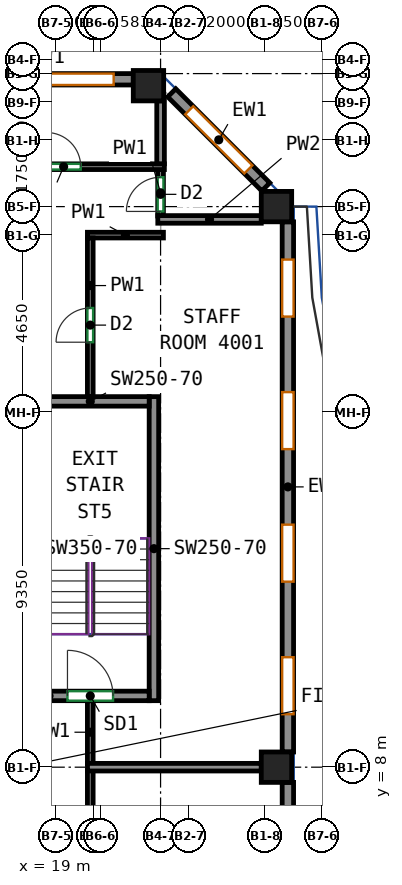
"""IFC4 building model, lengths in metres.
Left out: names, types, materials, properties, quantities, classifications, styles, units other than length and angle.
Written with IfcOpenShell. Run it as: python <this file> out.ifc"""

import sys

from ifc_helpers import new_model, si_unit, direction, frame, frame_2d, origin, origin_2d, place, context, subcontext, project, spatial, rectangle, extrude, source, transform, mapped, element, fill, save


model = new_model("IFC4")
c1 = context("Model", 3, precision=1e-05, world=origin(), true_north=direction((0.0, 1.0)))
c2 = subcontext(c1, "Body", "Model", "MODEL_VIEW")
j1 = project(units=[si_unit("LENGTHUNIT", "METRE"), si_unit("PLANEANGLEUNIT", "RADIAN")], contexts=[c1])
p1 = place(None, origin())
s1 = spatial("IfcSite", under=j1, at=p1, CompositionType="ELEMENT")
p2 = place(p1, origin())
s2 = spatial("IfcBuilding", under=s1, at=p2, CompositionType="ELEMENT")
p3 = place(p2, frame((0.0, 0.0, 171.9)))
s3 = spatial("IfcBuildingStorey", under=s2, at=p3, CompositionType="ELEMENT", Elevation=171.9)
m1 = source(origin(), c2, "Body", "SweptSolid", [
    extrude(rectangle(XDim=0.8, YDim=0.8, at=origin_2d()), origin(), (0.0, 0.0, 1.0), 3.12),
])
for number, where, z_axis, x_axis in (
    (1, (21.432, 25.932, 0.0), (0.0, 0.0, 1.0), (1.0, 0.0, 0.0)),
    (2, (24.8, 8.0, 0.0), (0.0, 0.0, 1.0), (1.0, 0.0, 0.0)),
    (3, (24.8, 22.75, 0.0), (0.0, 0.0, 1.0), (1.0, 0.0, 0.0)),
):
    element("IfcColumn", number, at=place(p3, frame(where, z_axis=z_axis, x_axis=x_axis)), inside=s3, PredefinedType="COLUMN", context=c2, shape_type="MappedRepresentation", body=[
        mapped(m1, transform((0.0, 0.0, 0.0))),
    ])
m2 = source(origin(), c2, "Body", "SweptSolid", [
    extrude(rectangle(XDim=8.0, YDim=0.25, at=frame_2d((4.0, 0.0))), origin(), (0.0, 0.0, 1.0), 3.12),
])
p4 = place(p3, frame((21.575, 9.75, 0.0), z_axis=(0.0, 0.0, 1.0), x_axis=(0.0, 1.0, 0.0)))
e4 = element("IfcWall", 4, at=p4, inside=s3, PredefinedType="SHEAR", context=c2, shape_type="MappedRepresentation", body=[
    mapped(m2, transform((0.0, 0.0, 0.0))),
])
m3 = source(origin(), c2, "Body", "SweptSolid", [
    extrude(rectangle(XDim=3.1, YDim=0.25, at=frame_2d((1.55, 0.0))), origin(), (0.0, 0.0, 1.0), 3.12),
])
p5 = place(p3, frame((18.35, 9.875, 0.0), z_axis=(0.0, 0.0, 1.0), x_axis=(1.0, 0.0, 0.0)))
e5 = element("IfcWall", 5, at=p5, inside=s3, PredefinedType="SHEAR", context=c2, shape_type="MappedRepresentation", body=[
    mapped(m3, transform((0.0, 0.0, 0.0))),
])
p6 = place(p5, frame((0.95, 0.0, 0.0)))
e6 = element("IfcOpeningElement", 6, at=p6, cuts=e5, PredefinedType="OPENING", context=c2, shape_type="SweptSolid", body=[
    extrude(rectangle(XDim=1.2, YDim=2.1, at=frame_2d((0.6, 1.05))), frame((0.0, 0.135, 0.0), z_axis=(0.0, -1.0, 0.0), x_axis=(1.0, 0.0, 0.0)), (0.0, 0.0, 1.0), 0.27),
])
p7 = place(p3, frame((18.35, 17.625, 0.0), z_axis=(0.0, 0.0, 1.0), x_axis=(1.0, 0.0, 0.0)))
e7 = element("IfcWall", 7, at=p7, inside=s3, PredefinedType="SHEAR", context=c2, shape_type="MappedRepresentation", body=[
    mapped(m3, transform((0.0, 0.0, 0.0))),
])
m4 = source(origin(), c2, "Body", "SweptSolid", [
    extrude(rectangle(XDim=7.763, YDim=0.3, at=frame_2d((3.881, 0.0))), origin(), (0.0, 0.0, 1.0), 3.12),
])
p8 = place(p3, frame((25.1, -0.163, 0.0), z_axis=(0.0, 0.0, 1.0), x_axis=(0.0, 1.0, 0.0)))
e8 = element("IfcWall", 8, at=p8, inside=s3, PredefinedType="SOLIDWALL", context=c2, shape_type="MappedRepresentation", body=[
    mapped(m4, transform((0.0, 0.0, 0.0))),
])
p9 = place(p8, frame((1.75, 0.0, 0.85)))
e9 = element("IfcOpeningElement", 9, at=p9, cuts=e8, PredefinedType="OPENING", context=c2, shape_type="SweptSolid", body=[
    extrude(rectangle(XDim=1.5, YDim=1.95, at=frame_2d((0.75, 0.975))), frame((0.0, 0.16, 0.0), z_axis=(0.0, -1.0, 0.0), x_axis=(1.0, 0.0, 0.0)), (0.0, 0.0, 1.0), 0.32),
])
p10 = place(p8, frame((5.631, 0.0, 0.85)))
e10 = element("IfcOpeningElement", 10, at=p10, cuts=e8, PredefinedType="OPENING", context=c2, shape_type="SweptSolid", body=[
    extrude(rectangle(XDim=1.5, YDim=1.95, at=frame_2d((0.75, 0.975))), frame((0.0, 0.16, 0.0), z_axis=(0.0, -1.0, 0.0), x_axis=(1.0, 0.0, 0.0)), (0.0, 0.0, 1.0), 0.32),
])
p11 = place(p8, frame((4.331, 0.0, 0.0)))
e11 = element("IfcOpeningElement", 11, at=p11, cuts=e8, PredefinedType="OPENING", context=c2, shape_type="SweptSolid", body=[
    extrude(rectangle(XDim=1.0, YDim=2.1, at=frame_2d((0.5, 1.05))), frame((0.0, 0.16, 0.0), z_axis=(0.0, -1.0, 0.0), x_axis=(1.0, 0.0, 0.0)), (0.0, 0.0, 1.0), 0.32),
])
m5 = source(origin(), c2, "Body", "SweptSolid", [
    extrude(rectangle(XDim=13.95, YDim=0.3, at=frame_2d((6.975, 0.0))), origin(), (0.0, 0.0, 1.0), 3.12),
])
p12 = place(p3, frame((25.1, 8.4, 0.0), z_axis=(0.0, 0.0, 1.0), x_axis=(0.0, 1.0, 0.0)))
e12 = element("IfcWall", 12, at=p12, inside=s3, PredefinedType="SOLIDWALL", context=c2, shape_type="MappedRepresentation", body=[
    mapped(m5, transform((0.0, 0.0, 0.0))),
])
p13 = place(p12, frame((0.994, 0.0, 0.85)))
e13 = element("IfcOpeningElement", 13, at=p13, cuts=e12, PredefinedType="OPENING", context=c2, shape_type="SweptSolid", body=[
    extrude(rectangle(XDim=1.5, YDim=1.95, at=frame_2d((0.75, 0.975))), frame((0.0, 0.16, 0.0), z_axis=(0.0, -1.0, 0.0), x_axis=(1.0, 0.0, 0.0)), (0.0, 0.0, 1.0), 0.32),
])
p14 = place(p12, frame((4.481, 0.0, 0.85)))
e14 = element("IfcOpeningElement", 14, at=p14, cuts=e12, PredefinedType="OPENING", context=c2, shape_type="SweptSolid", body=[
    extrude(rectangle(XDim=1.5, YDim=1.95, at=frame_2d((0.75, 0.975))), frame((0.0, 0.16, 0.0), z_axis=(0.0, -1.0, 0.0), x_axis=(1.0, 0.0, 0.0)), (0.0, 0.0, 1.0), 0.32),
])
p15 = place(p12, frame((7.969, 0.0, 0.85)))
e15 = element("IfcOpeningElement", 15, at=p15, cuts=e12, PredefinedType="OPENING", context=c2, shape_type="SweptSolid", body=[
    extrude(rectangle(XDim=1.5, YDim=1.95, at=frame_2d((0.75, 0.975))), frame((0.0, 0.16, 0.0), z_axis=(0.0, -1.0, 0.0), x_axis=(1.0, 0.0, 0.0)), (0.0, 0.0, 1.0), 0.32),
])
p16 = place(p12, frame((11.456, 0.0, 0.85)))
e16 = element("IfcOpeningElement", 16, at=p16, cuts=e12, PredefinedType="OPENING", context=c2, shape_type="SweptSolid", body=[
    extrude(rectangle(XDim=1.5, YDim=1.95, at=frame_2d((0.75, 0.975))), frame((0.0, 0.16, 0.0), z_axis=(0.0, -1.0, 0.0), x_axis=(1.0, 0.0, 0.0)), (0.0, 0.0, 1.0), 0.32),
])
m6 = source(origin(), c2, "Body", "SweptSolid", [
    extrude(rectangle(XDim=3.5, YDim=0.3, at=frame_2d((1.75, 0.0))), origin(), (0.0, 0.0, 1.0), 3.12),
])
p17 = place(p3, frame((24.519, 23.269, 0.0), z_axis=(0.0, 0.0, 1.0), x_axis=(-0.70707190453, 0.707141656123, 0.0)))
e17 = element("IfcWall", 17, at=p17, inside=s3, PredefinedType="SOLIDWALL", context=c2, shape_type="MappedRepresentation", body=[
    mapped(m6, transform((0.0, 0.0, 0.0))),
])
p18 = place(p17, frame((0.65, 0.0, 0.85)))
e18 = element("IfcOpeningElement", 18, at=p18, cuts=e17, PredefinedType="OPENING", context=c2, shape_type="SweptSolid", body=[
    extrude(rectangle(XDim=2.2, YDim=1.95, at=frame_2d((1.1, 0.975))), frame((0.0, 0.16, 0.0), z_axis=(0.0, -1.0, 0.0), x_axis=(1.0, 0.0, 0.0)), (0.0, 0.0, 1.0), 0.32),
])
m7 = source(origin(), c2, "Body", "SweptSolid", [
    extrude(rectangle(XDim=6.465, YDim=0.3, at=frame_2d((3.232, 0.0))), origin(), (0.0, 0.0, 1.0), 3.12),
])
p19 = place(p3, frame((21.032, 26.1, 0.0), z_axis=(0.0, 0.0, 1.0), x_axis=(-1.0, 0.0, 0.0)))
e19 = element("IfcWall", 19, at=p19, inside=s3, PredefinedType="SOLIDWALL", context=c2, shape_type="MappedRepresentation", body=[
    mapped(m7, transform((0.0, 0.0, 0.0))),
])
p20 = place(p19, frame((0.516, 0.0, 0.85)))
e20 = element("IfcOpeningElement", 20, at=p20, cuts=e19, PredefinedType="OPENING", context=c2, shape_type="SweptSolid", body=[
    extrude(rectangle(XDim=2.2, YDim=1.95, at=frame_2d((1.1, 0.975))), frame((0.0, 0.16, 0.0), z_axis=(0.0, -1.0, 0.0), x_axis=(1.0, 0.0, 0.0)), (0.0, 0.0, 1.0), 0.32),
])
p21 = place(p19, frame((3.749, 0.0, 0.85)))
e21 = element("IfcOpeningElement", 21, at=p21, cuts=e19, PredefinedType="OPENING", context=c2, shape_type="SweptSolid", body=[
    extrude(rectangle(XDim=2.2, YDim=1.95, at=frame_2d((1.1, 0.975))), frame((0.0, 0.16, 0.0), z_axis=(0.0, -1.0, 0.0), x_axis=(1.0, 0.0, 0.0)), (0.0, 0.0, 1.0), 0.32),
])
p22 = place(p3, frame((19.9, 3.809, 0.0), z_axis=(0.0, 0.0, 1.0), x_axis=(0.0, 1.0, 0.0)))
e22 = element("IfcWall", 22, at=p22, inside=s3, PredefinedType="PARTITIONING", context=c2, shape_type="SweptSolid", body=[
    extrude(rectangle(XDim=4.101, YDim=0.15, at=frame_2d((2.05, 0.0))), origin(), (0.0, 0.0, 1.0), 3.12),
])
p23 = place(p22, frame((0.4, 0.0, 0.0)))
e23 = element("IfcOpeningElement", 23, at=p23, cuts=e22, PredefinedType="OPENING", context=c2, shape_type="SweptSolid", body=[
    extrude(rectangle(XDim=1.0, YDim=2.1, at=frame_2d((0.5, 1.05))), frame((0.0, 0.085, 0.0), z_axis=(0.0, -1.0, 0.0), x_axis=(1.0, 0.0, 0.0)), (0.0, 0.0, 1.0), 0.17),
])
p24 = place(p3, frame((19.825, 22.0, 0.0), z_axis=(0.0, 0.0, 1.0), x_axis=(1.0, 0.0, 0.0)))
e24 = element("IfcWall", 24, at=p24, inside=s3, PredefinedType="PARTITIONING", context=c2, shape_type="SweptSolid", body=[
    extrude(rectangle(XDim=2.0, YDim=0.15, at=frame_2d((1.0, 0.0))), origin(), (0.0, 0.0, 1.0), 3.12),
])
p25 = place(p3, frame((19.9, 17.75, 0.0), z_axis=(0.0, 0.0, 1.0), x_axis=(0.0, 1.0, 0.0)))
e25 = element("IfcWall", 25, at=p25, inside=s3, PredefinedType="PARTITIONING", context=c2, shape_type="SweptSolid", body=[
    extrude(rectangle(XDim=4.175, YDim=0.15, at=frame_2d((2.087, 0.0))), origin(), (0.0, 0.0, 1.0), 3.12),
])
p26 = place(p25, frame((1.432, 0.0, 0.0)))
e26 = element("IfcOpeningElement", 26, at=p26, cuts=e25, PredefinedType="OPENING", context=c2, shape_type="SweptSolid", body=[
    extrude(rectangle(XDim=0.9, YDim=2.1, at=frame_2d((0.45, 1.05))), frame((0.0, 0.085, 0.0), z_axis=(0.0, -1.0, 0.0), x_axis=(1.0, 0.0, 0.0)), (0.0, 0.0, 1.0), 0.17),
])
p27 = place(p3, frame((19.9, 8.09, 0.0), z_axis=(0.0, 0.0, 1.0), x_axis=(0.0, 1.0, 0.0)))
e27 = element("IfcWall", 27, at=p27, inside=s3, PredefinedType="PARTITIONING", context=c2, shape_type="SweptSolid", body=[
    extrude(rectangle(XDim=1.66, YDim=0.15, at=frame_2d((0.83, 0.0))), origin(), (0.0, 0.0, 1.0), 3.12),
])
p28 = place(p3, frame((21.75, 22.503, 0.0), z_axis=(0.0, 0.0, 1.0), x_axis=(0.0, 1.0, 0.0)))
e28 = element("IfcWall", 28, at=p28, inside=s3, PredefinedType="PARTITIONING", context=c2, shape_type="SweptSolid", body=[
    extrude(rectangle(XDim=1.222, YDim=0.15, at=frame_2d((0.611, 0.0))), origin(), (0.0, 0.0, 1.0), 3.12),
])
p29 = place(p28, frame((0.12, 0.0, 0.0)))
e29 = element("IfcOpeningElement", 29, at=p29, cuts=e28, PredefinedType="OPENING", context=c2, shape_type="SweptSolid", body=[
    extrude(rectangle(XDim=0.9, YDim=2.1, at=frame_2d((0.45, 1.05))), frame((0.0, 0.085, 0.0), z_axis=(0.0, -1.0, 0.0), x_axis=(1.0, 0.0, 0.0)), (0.0, 0.0, 1.0), 0.17),
])
p30 = place(p3, frame((-20.059, 23.8, 0.0), z_axis=(0.0, 0.0, 1.0), x_axis=(1.0, 0.0, 0.0)))
e30 = element("IfcWall", 30, at=p30, inside=s3, PredefinedType="PARTITIONING", context=c2, shape_type="SweptSolid", body=[
    extrude(rectangle(XDim=41.909, YDim=0.15, at=frame_2d((20.955, 0.0))), origin(), (0.0, 0.0, 1.0), 3.12),
])
p31 = place(p30, frame((2.101, 0.0, 0.0)))
e31 = element("IfcOpeningElement", 31, at=p31, cuts=e30, PredefinedType="OPENING", context=c2, shape_type="SweptSolid", body=[
    extrude(rectangle(XDim=0.9, YDim=2.1, at=frame_2d((0.45, 1.05))), frame((0.0, 0.085, 0.0), z_axis=(0.0, -1.0, 0.0), x_axis=(1.0, 0.0, 0.0)), (0.0, 0.0, 1.0), 0.17),
])
p32 = place(p30, frame((4.585, 0.0, 0.0)))
e32 = element("IfcOpeningElement", 32, at=p32, cuts=e30, PredefinedType="OPENING", context=c2, shape_type="SweptSolid", body=[
    extrude(rectangle(XDim=1.0, YDim=2.1, at=frame_2d((0.5, 1.05))), frame((0.0, 0.085, 0.0), z_axis=(0.0, -1.0, 0.0), x_axis=(1.0, 0.0, 0.0)), (0.0, 0.0, 1.0), 0.17),
])
p33 = place(p30, frame((8.175, 0.0, 0.0)))
e33 = element("IfcOpeningElement", 33, at=p33, cuts=e30, PredefinedType="OPENING", context=c2, shape_type="SweptSolid", body=[
    extrude(rectangle(XDim=0.9, YDim=2.1, at=frame_2d((0.45, 1.05))), frame((0.0, 0.085, 0.0), z_axis=(0.0, -1.0, 0.0), x_axis=(1.0, 0.0, 0.0)), (0.0, 0.0, 1.0), 0.17),
])
p34 = place(p30, frame((13.173, 0.0, 0.0)))
e34 = element("IfcOpeningElement", 34, at=p34, cuts=e30, PredefinedType="OPENING", context=c2, shape_type="SweptSolid", body=[
    extrude(rectangle(XDim=1.0, YDim=2.1, at=frame_2d((0.5, 1.05))), frame((0.0, 0.085, 0.0), z_axis=(0.0, -1.0, 0.0), x_axis=(1.0, 0.0, 0.0)), (0.0, 0.0, 1.0), 0.17),
])
p35 = place(p30, frame((15.658, 0.0, 0.0)))
e35 = element("IfcOpeningElement", 35, at=p35, cuts=e30, PredefinedType="OPENING", context=c2, shape_type="SweptSolid", body=[
    extrude(rectangle(XDim=0.9, YDim=2.1, at=frame_2d((0.45, 1.05))), frame((0.0, 0.085, 0.0), z_axis=(0.0, -1.0, 0.0), x_axis=(1.0, 0.0, 0.0)), (0.0, 0.0, 1.0), 0.17),
])
p36 = place(p30, frame((21.315, 0.0, 0.0)))
e36 = element("IfcOpeningElement", 36, at=p36, cuts=e30, PredefinedType="OPENING", context=c2, shape_type="SweptSolid", body=[
    extrude(rectangle(XDim=0.9, YDim=2.1, at=frame_2d((0.45, 1.05))), frame((0.0, 0.085, 0.0), z_axis=(0.0, -1.0, 0.0), x_axis=(1.0, 0.0, 0.0)), (0.0, 0.0, 1.0), 0.17),
])
p37 = place(p30, frame((24.625, 0.0, 0.0)))
e37 = element("IfcOpeningElement", 37, at=p37, cuts=e30, PredefinedType="OPENING", context=c2, shape_type="SweptSolid", body=[
    extrude(rectangle(XDim=1.0, YDim=2.1, at=frame_2d((0.5, 1.05))), frame((0.0, 0.085, 0.0), z_axis=(0.0, -1.0, 0.0), x_axis=(1.0, 0.0, 0.0)), (0.0, 0.0, 1.0), 0.17),
])
p38 = place(p30, frame((29.043, 0.0, 0.0)))
e38 = element("IfcOpeningElement", 38, at=p38, cuts=e30, PredefinedType="OPENING", context=c2, shape_type="SweptSolid", body=[
    extrude(rectangle(XDim=0.9, YDim=2.1, at=frame_2d((0.45, 1.05))), frame((0.0, 0.085, 0.0), z_axis=(0.0, -1.0, 0.0), x_axis=(1.0, 0.0, 0.0)), (0.0, 0.0, 1.0), 0.17),
])
p39 = place(p30, frame((32.735, 0.0, 0.0)))
e39 = element("IfcOpeningElement", 39, at=p39, cuts=e30, PredefinedType="OPENING", context=c2, shape_type="SweptSolid", body=[
    extrude(rectangle(XDim=1.0, YDim=2.1, at=frame_2d((0.5, 1.05))), frame((0.0, 0.085, 0.0), z_axis=(0.0, -1.0, 0.0), x_axis=(1.0, 0.0, 0.0)), (0.0, 0.0, 1.0), 0.17),
])
p40 = place(p30, frame((36.627, 0.0, 0.0)))
e40 = element("IfcOpeningElement", 40, at=p40, cuts=e30, PredefinedType="OPENING", context=c2, shape_type="SweptSolid", body=[
    extrude(rectangle(XDim=0.9, YDim=2.1, at=frame_2d((0.45, 1.05))), frame((0.0, 0.085, 0.0), z_axis=(0.0, -1.0, 0.0), x_axis=(1.0, 0.0, 0.0)), (0.0, 0.0, 1.0), 0.17),
])
p41 = place(p30, frame((38.808, 0.0, 0.0)))
e41 = element("IfcOpeningElement", 41, at=p41, cuts=e30, PredefinedType="OPENING", context=c2, shape_type="SweptSolid", body=[
    extrude(rectangle(XDim=0.9, YDim=2.1, at=frame_2d((0.45, 1.05))), frame((0.0, 0.085, 0.0), z_axis=(0.0, -1.0, 0.0), x_axis=(1.0, 0.0, 0.0)), (0.0, 0.0, 1.0), 0.17),
])
p42 = place(p3, frame((19.827, 8.0, 0.0), z_axis=(0.0, 0.0, 1.0), x_axis=(1.0, 0.0, 0.0)))
e42 = element("IfcWall", 42, at=p42, inside=s3, PredefinedType="PARTITIONING", context=c2, shape_type="SweptSolid", body=[
    extrude(rectangle(XDim=4.573, YDim=0.2, at=frame_2d((2.287, 0.0))), origin(), (0.0, 0.0, 1.0), 3.12),
])
p43 = place(p3, frame((24.4, 22.413, 0.0), z_axis=(0.0, 0.0, 1.0), x_axis=(-1.0, 0.0, 0.0)))
e43 = element("IfcWall", 43, at=p43, inside=s3, PredefinedType="PARTITIONING", context=c2, shape_type="SweptSolid", body=[
    extrude(rectangle(XDim=2.723, YDim=0.2, at=frame_2d((1.361, 0.0))), origin(), (0.0, 0.0, 1.0), 2.52),
])
p44 = place(p3, frame((21.75, 25.532, 0.0), z_axis=(0.0, 0.0, 1.0), x_axis=(0.0, -1.0, 0.0)))
e44 = element("IfcWall", 44, at=p44, inside=s3, PredefinedType="PARTITIONING", context=c2, shape_type="SweptSolid", body=[
    extrude(rectangle(XDim=1.655, YDim=0.2, at=frame_2d((0.828, 0.0))), origin(), (0.0, 0.0, 1.0), 3.12),
])
p45 = place(p13, origin())
e45 = element("IfcWindow", 45, at=p45, inside=s3, PartitioningType="SINGLE_PANEL", PredefinedType="WINDOW", context=c2, shape_type="SweptSolid", body=[
    extrude(rectangle(XDim=1.5, YDim=1.95, at=frame_2d((0.75, 0.975))), frame((0.0, 0.03, 0.0), z_axis=(0.0, -1.0, 0.0), x_axis=(1.0, 0.0, 0.0)), (0.0, 0.0, 1.0), 0.06),
])
fill(e13, e45)
p46 = place(p14, origin())
e46 = element("IfcWindow", 46, at=p46, inside=s3, PartitioningType="SINGLE_PANEL", PredefinedType="WINDOW", context=c2, shape_type="SweptSolid", body=[
    extrude(rectangle(XDim=1.5, YDim=1.95, at=frame_2d((0.75, 0.975))), frame((0.0, 0.03, 0.0), z_axis=(0.0, -1.0, 0.0), x_axis=(1.0, 0.0, 0.0)), (0.0, 0.0, 1.0), 0.06),
])
fill(e14, e46)
p47 = place(p15, origin())
e47 = element("IfcWindow", 47, at=p47, inside=s3, PartitioningType="SINGLE_PANEL", PredefinedType="WINDOW", context=c2, shape_type="SweptSolid", body=[
    extrude(rectangle(XDim=1.5, YDim=1.95, at=frame_2d((0.75, 0.975))), frame((0.0, 0.03, 0.0), z_axis=(0.0, -1.0, 0.0), x_axis=(1.0, 0.0, 0.0)), (0.0, 0.0, 1.0), 0.06),
])
fill(e15, e47)
p48 = place(p16, origin())
e48 = element("IfcWindow", 48, at=p48, inside=s3, PartitioningType="SINGLE_PANEL", PredefinedType="WINDOW", context=c2, shape_type="SweptSolid", body=[
    extrude(rectangle(XDim=1.5, YDim=1.95, at=frame_2d((0.75, 0.975))), frame((0.0, 0.03, 0.0), z_axis=(0.0, -1.0, 0.0), x_axis=(1.0, 0.0, 0.0)), (0.0, 0.0, 1.0), 0.06),
])
fill(e16, e48)
p49 = place(p18, origin())
e49 = element("IfcWindow", 49, at=p49, inside=s3, PartitioningType="SINGLE_PANEL", PredefinedType="WINDOW", context=c2, shape_type="SweptSolid", body=[
    extrude(rectangle(XDim=2.2, YDim=1.95, at=frame_2d((1.1, 0.975))), frame((0.0, 0.03, 0.0), z_axis=(0.0, -1.0, 0.0), x_axis=(1.0, 0.0, 0.0)), (0.0, 0.0, 1.0), 0.06),
])
fill(e18, e49)
p50 = place(p20, origin())
e50 = element("IfcWindow", 50, at=p50, inside=s3, PartitioningType="SINGLE_PANEL", PredefinedType="WINDOW", context=c2, shape_type="SweptSolid", body=[
    extrude(rectangle(XDim=2.2, YDim=1.95, at=frame_2d((1.1, 0.975))), frame((0.0, 0.03, 0.0), z_axis=(0.0, -1.0, 0.0), x_axis=(1.0, 0.0, 0.0)), (0.0, 0.0, 1.0), 0.06),
])
fill(e20, e50)
p51 = place(p6, origin())
e51 = element("IfcDoor", 51, at=p51, inside=s3, OperationType="DOUBLE_DOOR_SINGLE_SWING", PredefinedType="DOOR", context=c2, shape_type="SweptSolid", body=[
    extrude(rectangle(XDim=1.2, YDim=2.1, at=frame_2d((0.6, 1.05))), frame((0.0, 0.025, 0.0), z_axis=(0.0, -1.0, 0.0), x_axis=(1.0, 0.0, 0.0)), (0.0, 0.0, 1.0), 0.05),
])
fill(e6, e51)
p52 = place(p26, origin())
e52 = element("IfcDoor", 52, at=p52, inside=s3, OperationType="SINGLE_SWING_LEFT", PredefinedType="DOOR", context=c2, shape_type="SweptSolid", body=[
    extrude(rectangle(XDim=0.9, YDim=2.1, at=frame_2d((0.45, 1.05))), frame((0.0, 0.025, 0.0), z_axis=(0.0, -1.0, 0.0), x_axis=(1.0, 0.0, 0.0)), (0.0, 0.0, 1.0), 0.05),
])
fill(e26, e52)
p53 = place(p29, origin())
e53 = element("IfcDoor", 53, at=p53, inside=s3, OperationType="SINGLE_SWING_LEFT", PredefinedType="DOOR", context=c2, shape_type="SweptSolid", body=[
    extrude(rectangle(XDim=0.9, YDim=2.1, at=frame_2d((0.45, 1.05))), frame((0.0, 0.025, 0.0), z_axis=(0.0, -1.0, 0.0), x_axis=(1.0, 0.0, 0.0)), (0.0, 0.0, 1.0), 0.05),
])
fill(e29, e53)
p54 = place(p41, origin())
e54 = element("IfcDoor", 54, at=p54, inside=s3, OperationType="SINGLE_SWING_LEFT", PredefinedType="DOOR", context=c2, shape_type="SweptSolid", body=[
    extrude(rectangle(XDim=0.9, YDim=2.1, at=frame_2d((0.45, 1.05))), frame((0.0, 0.025, 0.0), z_axis=(0.0, -1.0, 0.0), x_axis=(1.0, 0.0, 0.0)), (0.0, 0.0, 1.0), 0.05),
])
fill(e41, e54)
save(model, sys.argv[1])
